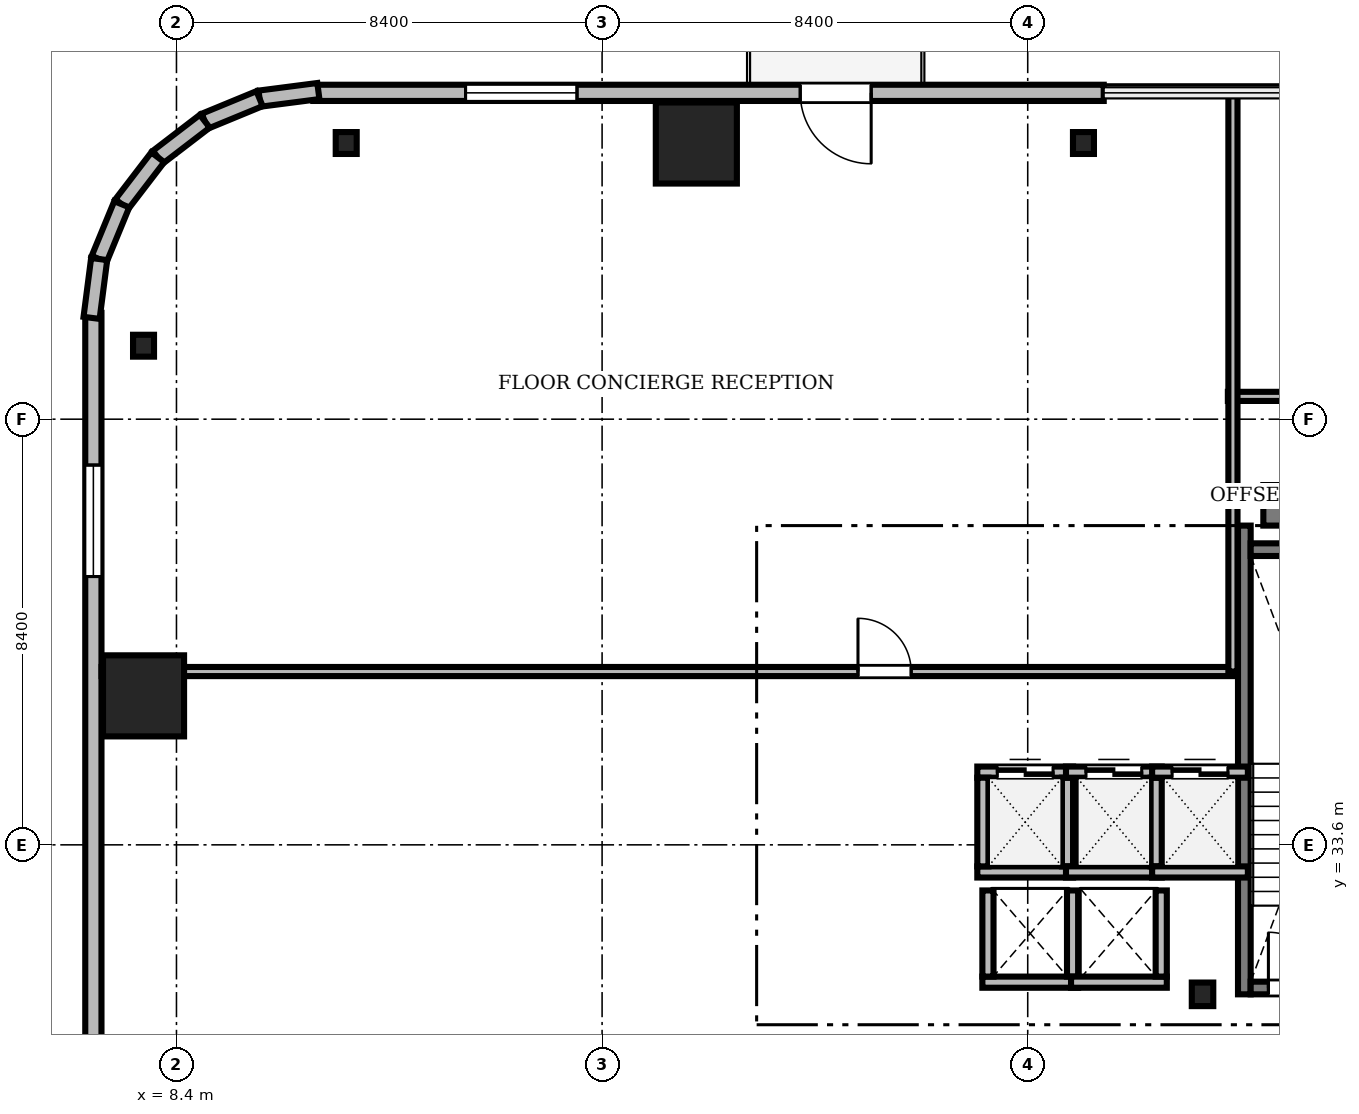
"""IFC4 building model, lengths in metres.
Left out: names, types, materials, properties, quantities, classifications, styles, units other than length and angle.
Written with IfcOpenShell. Run it as: python <this file> out.ifc"""

import sys

from ifc_helpers import new_model, si_unit, direction, frame, frame_2d, origin, origin_2d, place, context, subcontext, project, spatial, rectangle, i_section, extrude, source, transform, mapped, element, fill, save


model = new_model("IFC4")
c1 = context("Model", 3, precision=1e-05, world=origin(), true_north=direction((0.0, 1.0)))
c2 = subcontext(c1, "Body", "Model", "MODEL_VIEW")
j1 = project(units=[si_unit("LENGTHUNIT", "METRE"), si_unit("PLANEANGLEUNIT", "RADIAN")], contexts=[c1])
p1 = place(None, origin())
s1 = spatial("IfcSite", under=j1, at=p1, CompositionType="ELEMENT")
p2 = place(p1, origin())
s2 = spatial("IfcBuilding", under=s1, at=p2, CompositionType="ELEMENT")
p3 = place(p2, frame((0.0, 0.0, 152.0)))
s3 = spatial("IfcBuildingStorey", under=s2, at=p3, CompositionType="ELEMENT", Elevation=152.0)
m1 = source(origin(), c2, "Body", "SweptSolid", [
    extrude(rectangle(XDim=17.52, YDim=0.8, at=frame_2d((8.76, 0.0))), origin(), (0.0, 0.0, 1.0), 3.46),
])
p4 = place(p3, frame((29.85, 40.3, 0.0), z_axis=(0.0, 0.0, 1.0), x_axis=(1.0, 0.0, 0.0)))
e1 = element("IfcWall", 1, at=p4, inside=s3, PredefinedType="SHEAR", context=c2, shape_type="MappedRepresentation", body=[
    mapped(m1, transform((0.0, 0.0, 0.0), scale=1.0)),
])
m2 = source(origin(), c2, "Body", "SweptSolid", [
    extrude(i_section(OverallWidth=0.424, OverallDepth=0.465, WebThickness=0.035, FlangeThickness=0.056, FilletRadius=0.015, at=origin_2d()), origin(), (0.0, 0.0, 1.0), 3.46),
])
p5 = place(p3, frame((28.65, 30.65, 0.0), z_axis=(0.0, 0.0, 1.0), x_axis=(1.0, 0.0, 0.0)))
e2 = element("IfcColumn", 2, at=p5, inside=s3, PredefinedType="COLUMN", context=c2, shape_type="MappedRepresentation", body=[
    mapped(m2, transform((0.0, 0.0, 0.0), scale=1.0)),
])
m3 = source(origin(), c2, "Body", "SweptSolid", [
    extrude(rectangle(XDim=1.6, YDim=1.6, at=origin_2d()), origin(), (0.0, 0.0, 1.0), 3.46),
])
for number, where, z_axis, x_axis in (
    (3, (18.66, 47.45, 0.0), (0.0, 0.0, 1.0), (1.0, 0.0, 0.0)),
    (4, (7.75, 36.54, 0.0), (0.0, 0.0, 1.0), (1.0, 0.0, 0.0)),
):
    element("IfcColumn", number, at=place(p3, frame(where, z_axis=z_axis, x_axis=x_axis)), inside=s3, PredefinedType="COLUMN", context=c2, shape_type="MappedRepresentation", body=[
        mapped(m3, transform((0.0, 0.0, 0.0), scale=1.0)),
    ])
m4 = source(origin(), c2, "Body", "SweptSolid", [
    extrude(i_section(OverallWidth=0.414, OverallDepth=0.432, WebThickness=0.026, FlangeThickness=0.04, FilletRadius=0.015, at=origin_2d()), origin(), (0.0, 0.0, 1.0), 3.46),
])
for number, where, z_axis, x_axis in (
    (5, (26.3, 47.45, 0.0), (0.0, 0.0, 1.0), (1.0, 0.0, 0.0)),
    (6, (11.75, 47.45, 0.0), (0.0, 0.0, 1.0), (1.0, 0.0, 0.0)),
    (7, (7.75, 43.45, 0.0), (0.0, 0.0, 1.0), (1.0, 0.0, 0.0)),
):
    element("IfcColumn", number, at=place(p3, frame(where, z_axis=z_axis, x_axis=x_axis)), inside=s3, PredefinedType="COLUMN", context=c2, shape_type="MappedRepresentation", body=[
        mapped(m4, transform((0.0, 0.0, 0.0), scale=1.0)),
    ])
m5 = source(origin(), c2, "Body", "SweptSolid", [
    extrude(rectangle(XDim=15.6, YDim=0.32, at=frame_2d((7.8, 0.0))), origin(), (0.0, 0.0, 1.0), 3.46),
])
p6 = place(p3, frame((26.7, 48.44, 0.0), z_axis=(0.0, 0.0, 1.0), x_axis=(-1.0, 0.0, 0.0)))
e8 = element("IfcWall", 8, at=p6, inside=s3, PredefinedType="SOLIDWALL", context=c2, shape_type="MappedRepresentation", body=[
    mapped(m5, transform((0.0, 0.0, 0.0), scale=1.0)),
])
m6 = source(origin(), c2, "Body", "SweptSolid", [
    extrude(rectangle(XDim=1.4, YDim=2.3, at=frame_2d((0.7, 1.15))), frame((0.0, 0.17, 0.0), z_axis=(0.0, -1.0, 0.0), x_axis=(1.0, 0.0, 0.0)), (0.0, 0.0, 1.0), 0.34),
])
p7 = place(p6, frame((4.59, 0.0, 0.0)))
e9 = element("IfcOpeningElement", 9, at=p7, cuts=e8, PredefinedType="OPENING", context=c2, shape_type="MappedRepresentation", body=[
    mapped(m6, transform((0.0, 0.0, 0.0), scale=1.0)),
])
m7 = source(origin(), c2, "Body", "SweptSolid", [
    extrude(rectangle(XDim=2.2, YDim=2.4, at=frame_2d((1.1, 1.2))), frame((0.0, 0.17, 0.0), z_axis=(0.0, -1.0, 0.0), x_axis=(1.0, 0.0, 0.0)), (0.0, 0.0, 1.0), 0.34),
])
p8 = place(p6, frame((10.395, 0.0, 0.72)))
e10 = element("IfcOpeningElement", 10, at=p8, cuts=e8, PredefinedType="OPENING", context=c2, shape_type="MappedRepresentation", body=[
    mapped(m7, transform((0.0, 0.0, 0.0), scale=1.0)),
])
m8 = source(origin(), c2, "Body", "SweptSolid", [
    extrude(rectangle(XDim=15.6, YDim=0.32, at=frame_2d((7.8, 0.0))), origin(), (0.0, 0.0, 1.0), 3.46),
])
p9 = place(p3, frame((6.76, 44.1, 0.0), z_axis=(0.0, 0.0, 1.0), x_axis=(0.0, -1.0, 0.0)))
e11 = element("IfcWall", 11, at=p9, inside=s3, PredefinedType="SOLIDWALL", context=c2, shape_type="MappedRepresentation", body=[
    mapped(m8, transform((0.0, 0.0, 0.0), scale=1.0)),
])
p10 = place(p9, frame((3.005, 0.0, 0.72)))
e12 = element("IfcOpeningElement", 12, at=p10, cuts=e11, PredefinedType="OPENING", context=c2, shape_type="MappedRepresentation", body=[
    mapped(m7, transform((0.0, 0.0, 0.0), scale=1.0)),
])
m9 = source(origin(), c2, "Body", "SweptSolid", [
    extrude(rectangle(XDim=1.17, YDim=0.32, at=frame_2d((0.585, 0.0))), origin(), (0.0, 0.0, 1.0), 3.46),
])
p11 = place(p3, frame((11.2, 48.476, 0.0), z_axis=(0.0, 0.0, 1.0), x_axis=(-0.991735963317, -0.128295670475, 0.0)))
e13 = element("IfcWall", 13, at=p11, inside=s3, PredefinedType="SOLIDWALL", context=c2, shape_type="MappedRepresentation", body=[
    mapped(m9, transform((0.0, 0.0, 0.0), scale=1.0)),
])
m10 = source(origin(), c2, "Body", "SweptSolid", [
    extrude(rectangle(XDim=1.169, YDim=0.32, at=frame_2d((0.584, 0.0))), origin(), (0.0, 0.0, 1.0), 3.46),
])
p12 = place(p3, frame((10.04, 48.325, 0.0), z_axis=(0.0, 0.0, 1.0), x_axis=(-0.924552646638, -0.381054331552, 0.0)))
e14 = element("IfcWall", 14, at=p12, inside=s3, PredefinedType="SOLIDWALL", context=c2, shape_type="MappedRepresentation", body=[
    mapped(m10, transform((0.0, 0.0, 0.0), scale=1.0)),
])
m11 = source(origin(), c2, "Body", "SweptSolid", [
    extrude(rectangle(XDim=1.169, YDim=0.32, at=frame_2d((0.584, 0.0))), origin(), (0.0, 0.0, 1.0), 3.46),
])
p13 = place(p3, frame((8.959, 47.88, 0.0), z_axis=(0.0, 0.0, 1.0), x_axis=(-0.793663520347, -0.608356981114, 0.0)))
e15 = element("IfcWall", 15, at=p13, inside=s3, PredefinedType="SOLIDWALL", context=c2, shape_type="MappedRepresentation", body=[
    mapped(m11, transform((0.0, 0.0, 0.0), scale=1.0)),
])
m12 = source(origin(), c2, "Body", "SweptSolid", [
    extrude(rectangle(XDim=1.169, YDim=0.32, at=frame_2d((0.584, 0.0))), origin(), (0.0, 0.0, 1.0), 3.46),
])
p14 = place(p3, frame((8.031, 47.169, 0.0), z_axis=(0.0, 0.0, 1.0), x_axis=(-0.608387696831, -0.793639975269, 0.0)))
e16 = element("IfcWall", 16, at=p14, inside=s3, PredefinedType="SOLIDWALL", context=c2, shape_type="MappedRepresentation", body=[
    mapped(m12, transform((0.0, 0.0, 0.0), scale=1.0)),
])
p15 = place(p3, frame((7.32, 46.241, 0.0), z_axis=(0.0, 0.0, 1.0), x_axis=(-0.381054331552, -0.924552646638, 0.0)))
e17 = element("IfcWall", 17, at=p15, inside=s3, PredefinedType="SOLIDWALL", context=c2, shape_type="MappedRepresentation", body=[
    mapped(m10, transform((0.0, 0.0, 0.0), scale=1.0)),
])
p16 = place(p3, frame((6.875, 45.16, 0.0), z_axis=(0.0, 0.0, 1.0), x_axis=(-0.128295670475, -0.991735963317, 0.0)))
e18 = element("IfcWall", 18, at=p16, inside=s3, PredefinedType="SOLIDWALL", context=c2, shape_type="MappedRepresentation", body=[
    mapped(m9, transform((0.0, 0.0, 0.0), scale=1.0)),
])
m13 = source(origin(), c2, "Body", "SweptSolid", [
    extrude(rectangle(XDim=9.25, YDim=0.25, at=frame_2d((4.625, 0.0))), origin(), (0.0, 0.0, 1.0), 3.5),
])
p17 = place(p3, frame((29.475, 30.65, 0.0), z_axis=(0.0, 0.0, 1.0), x_axis=(0.0, 1.0, 0.0)))
e19 = element("IfcWall", 19, at=p17, inside=s3, PredefinedType="SOLIDWALL", context=c2, shape_type="MappedRepresentation", body=[
    mapped(m13, transform((0.0, 0.0, 0.0), scale=1.0)),
])
m14 = source(origin(), c2, "Body", "SweptSolid", [
    extrude(rectangle(XDim=3.15, YDim=0.25, at=frame_2d((1.575, 0.0))), origin(), (0.0, 0.0, 1.0), 3.5),
])
p18 = place(p3, frame((29.6, 39.425, 0.0), z_axis=(0.0, 0.0, 1.0), x_axis=(1.0, 0.0, 0.0)))
e20 = element("IfcWall", 20, at=p18, inside=s3, PredefinedType="SOLIDWALL", context=c2, shape_type="MappedRepresentation", body=[
    mapped(m14, transform((0.0, 0.0, 0.0), scale=1.0)),
])
p19 = place(p3, frame((29.6, 30.775, 0.0), z_axis=(0.0, 0.0, 1.0), x_axis=(1.0, 0.0, 0.0)))
e21 = element("IfcWall", 21, at=p19, inside=s3, PredefinedType="SOLIDWALL", context=c2, shape_type="MappedRepresentation", body=[
    mapped(m14, transform((0.0, 0.0, 0.0), scale=1.0)),
])
m15 = source(origin(), c2, "Body", "SweptSolid", [
    extrude(rectangle(XDim=1.1, YDim=2.2, at=frame_2d((0.55, 1.1))), frame((0.0, 0.135, 0.0), z_axis=(0.0, -1.0, 0.0), x_axis=(1.0, 0.0, 0.0)), (0.0, 0.0, 1.0), 0.27),
])
p20 = place(p19, frame((0.35, 0.0, 0.0)))
e22 = element("IfcOpeningElement", 22, at=p20, cuts=e21, PredefinedType="OPENING", context=c2, shape_type="MappedRepresentation", body=[
    mapped(m15, transform((0.0, 0.0, 0.0), scale=1.0)),
])
m16 = source(origin(), c2, "Body", "SweptSolid", [
    extrude(rectangle(XDim=1.89, YDim=0.22, at=frame_2d((0.945, 0.0))), origin(), (0.0, 0.0, 1.0), 3.46),
])
p21 = place(p3, frame((24.205, 33.065, 0.0), z_axis=(0.0, 0.0, 1.0), x_axis=(1.0, 0.0, 0.0)))
e23 = element("IfcWall", 23, at=p21, inside=s3, PredefinedType="SOLIDWALL", context=c2, shape_type="MappedRepresentation", body=[
    mapped(m16, transform((0.0, 0.0, 0.0), scale=1.0)),
])
p22 = place(p3, frame((24.205, 35.035, 0.0), z_axis=(0.0, 0.0, 1.0), x_axis=(1.0, 0.0, 0.0)))
e24 = element("IfcWall", 24, at=p22, inside=s3, PredefinedType="SOLIDWALL", context=c2, shape_type="MappedRepresentation", body=[
    mapped(m16, transform((0.0, 0.0, 0.0), scale=1.0)),
])
m17 = source(origin(), c2, "Body", "SweptSolid", [
    extrude(rectangle(XDim=1.1, YDim=2.2, at=frame_2d((0.55, 1.1))), frame((0.0, 0.12, 0.0), z_axis=(0.0, -1.0, 0.0), x_axis=(1.0, 0.0, 0.0)), (0.0, 0.0, 1.0), 0.24),
])
p23 = place(p22, frame((0.395, 0.0, 0.0)))
e25 = element("IfcOpeningElement", 25, at=p23, cuts=e24, PredefinedType="OPENING", context=c2, shape_type="MappedRepresentation", body=[
    mapped(m17, transform((0.0, 0.0, 0.0), scale=1.0)),
])
m18 = source(origin(), c2, "Body", "SweptSolid", [
    extrude(rectangle(XDim=1.75, YDim=0.22, at=frame_2d((0.875, 0.0))), origin(), (0.0, 0.0, 1.0), 3.46),
])
for number, where, z_axis, x_axis in (
    (26, (24.315, 33.175, 0.0), (0.0, 0.0, 1.0), (0.0, 1.0, 0.0)),
    (27, (25.985, 33.175, 0.0), (0.0, 0.0, 1.0), (0.0, 1.0, 0.0)),
):
    element("IfcWall", number, at=place(p3, frame(where, z_axis=z_axis, x_axis=x_axis)), inside=s3, PredefinedType="SOLIDWALL", context=c2, shape_type="MappedRepresentation", body=[
        mapped(m18, transform((0.0, 0.0, 0.0), scale=1.0)),
    ])
p24 = place(p3, frame((25.955, 33.065, 0.0), z_axis=(0.0, 0.0, 1.0), x_axis=(1.0, 0.0, 0.0)))
e28 = element("IfcWall", 28, at=p24, inside=s3, PredefinedType="SOLIDWALL", context=c2, shape_type="MappedRepresentation", body=[
    mapped(m16, transform((0.0, 0.0, 0.0), scale=1.0)),
])
p25 = place(p3, frame((25.955, 35.035, 0.0), z_axis=(0.0, 0.0, 1.0), x_axis=(1.0, 0.0, 0.0)))
e29 = element("IfcWall", 29, at=p25, inside=s3, PredefinedType="SOLIDWALL", context=c2, shape_type="MappedRepresentation", body=[
    mapped(m16, transform((0.0, 0.0, 0.0), scale=1.0)),
])
p26 = place(p25, frame((0.395, 0.0, 0.0)))
e30 = element("IfcOpeningElement", 30, at=p26, cuts=e29, PredefinedType="OPENING", context=c2, shape_type="MappedRepresentation", body=[
    mapped(m17, transform((0.0, 0.0, 0.0), scale=1.0)),
])
p27 = place(p3, frame((27.735, 33.175, 0.0), z_axis=(0.0, 0.0, 1.0), x_axis=(0.0, 1.0, 0.0)))
e31 = element("IfcWall", 31, at=p27, inside=s3, PredefinedType="SOLIDWALL", context=c2, shape_type="MappedRepresentation", body=[
    mapped(m18, transform((0.0, 0.0, 0.0), scale=1.0)),
])
p28 = place(p3, frame((27.655, 33.065, 0.0), z_axis=(0.0, 0.0, 1.0), x_axis=(1.0, 0.0, 0.0)))
e32 = element("IfcWall", 32, at=p28, inside=s3, PredefinedType="SOLIDWALL", context=c2, shape_type="MappedRepresentation", body=[
    mapped(m16, transform((0.0, 0.0, 0.0), scale=1.0)),
])
p29 = place(p3, frame((27.655, 35.035, 0.0), z_axis=(0.0, 0.0, 1.0), x_axis=(1.0, 0.0, 0.0)))
e33 = element("IfcWall", 33, at=p29, inside=s3, PredefinedType="SOLIDWALL", context=c2, shape_type="MappedRepresentation", body=[
    mapped(m16, transform((0.0, 0.0, 0.0), scale=1.0)),
])
p30 = place(p29, frame((0.395, 0.0, 0.0)))
e34 = element("IfcOpeningElement", 34, at=p30, cuts=e33, PredefinedType="OPENING", context=c2, shape_type="MappedRepresentation", body=[
    mapped(m17, transform((0.0, 0.0, 0.0), scale=1.0)),
])
m19 = source(origin(), c2, "Body", "SweptSolid", [
    extrude(rectangle(XDim=1.89, YDim=0.22, at=frame_2d((0.945, 0.0))), origin(), (0.0, 0.0, 1.0), 3.46),
])
p31 = place(p3, frame((24.305, 30.89, 0.0), z_axis=(0.0, 0.0, 1.0), x_axis=(1.0, 0.0, 0.0)))
e35 = element("IfcWall", 35, at=p31, inside=s3, PredefinedType="SOLIDWALL", context=c2, shape_type="MappedRepresentation", body=[
    mapped(m19, transform((0.0, 0.0, 0.0), scale=1.0)),
])
m20 = source(origin(), c2, "Body", "SweptSolid", [
    extrude(rectangle(XDim=1.7, YDim=0.22, at=frame_2d((0.85, 0.0))), origin(), (0.0, 0.0, 1.0), 3.46),
])
for number, where, z_axis, x_axis in (
    (36, (24.415, 31.0, 0.0), (0.0, 0.0, 1.0), (0.0, 1.0, 0.0)),
    (37, (26.085, 31.0, 0.0), (0.0, 0.0, 1.0), (0.0, 1.0, 0.0)),
):
    element("IfcWall", number, at=place(p3, frame(where, z_axis=z_axis, x_axis=x_axis)), inside=s3, PredefinedType="SOLIDWALL", context=c2, shape_type="MappedRepresentation", body=[
        mapped(m20, transform((0.0, 0.0, 0.0), scale=1.0)),
    ])
p32 = place(p3, frame((26.055, 30.89, 0.0), z_axis=(0.0, 0.0, 1.0), x_axis=(1.0, 0.0, 0.0)))
e38 = element("IfcWall", 38, at=p32, inside=s3, PredefinedType="SOLIDWALL", context=c2, shape_type="MappedRepresentation", body=[
    mapped(m19, transform((0.0, 0.0, 0.0), scale=1.0)),
])
p33 = place(p3, frame((27.835, 31.0, 0.0), z_axis=(0.0, 0.0, 1.0), x_axis=(0.0, 1.0, 0.0)))
e39 = element("IfcWall", 39, at=p33, inside=s3, PredefinedType="SOLIDWALL", context=c2, shape_type="MappedRepresentation", body=[
    mapped(m20, transform((0.0, 0.0, 0.0), scale=1.0)),
])
m21 = source(origin(), c2, "Body", "SweptSolid", [
    extrude(rectangle(XDim=23.928, YDim=0.18, at=frame_2d((11.964, 0.0))), origin(), (0.0, 0.0, 1.0), 2.702),
])
p34 = place(p3, frame((29.15, 42.45, 0.0), z_axis=(0.0, 0.0, 1.0), x_axis=(1.0, 0.0, 0.0)))
e40 = element("IfcWall", 40, at=p34, inside=s3, PredefinedType="PARTITIONING", context=c2, shape_type="MappedRepresentation", body=[
    mapped(m21, transform((0.0, 0.0, 0.0), scale=1.0)),
])
m22 = source(origin(), c2, "Body", "SweptSolid", [
    extrude(rectangle(XDim=1.05, YDim=2.2, at=frame_2d((0.525, 1.1))), frame((0.0, 0.1, 0.0), z_axis=(0.0, -1.0, 0.0), x_axis=(1.0, 0.0, 0.0)), (0.0, 0.0, 1.0), 0.2),
])
p35 = place(p34, frame((4.5, 0.0, 0.0)))
e41 = element("IfcOpeningElement", 41, at=p35, cuts=e40, PredefinedType="OPENING", context=c2, shape_type="MappedRepresentation", body=[
    mapped(m22, transform((0.0, 0.0, 0.0), scale=1.0)),
])
m23 = source(origin(), c2, "Body", "SweptSolid", [
    extrude(rectangle(XDim=22.328, YDim=0.18, at=frame_2d((11.164, 0.0))), origin(), (0.0, 0.0, 1.0), 2.702),
])
p36 = place(p3, frame((6.922, 37.02, 0.0), z_axis=(0.0, 0.0, 1.0), x_axis=(1.0, 0.0, 0.0)))
e42 = element("IfcWall", 42, at=p36, inside=s3, PredefinedType="PARTITIONING", context=c2, shape_type="MappedRepresentation", body=[
    mapped(m23, transform((0.0, 0.0, 0.0), scale=1.0)),
])
p37 = place(p36, frame((14.928, 0.0, 0.0)))
e43 = element("IfcOpeningElement", 43, at=p37, cuts=e42, PredefinedType="OPENING", context=c2, shape_type="MappedRepresentation", body=[
    mapped(m22, transform((0.0, 0.0, 0.0), scale=1.0)),
])
m24 = source(origin(), c2, "Body", "SweptSolid", [
    extrude(rectangle(XDim=11.45, YDim=0.18, at=frame_2d((5.725, 0.0))), origin(), (0.0, 0.0, 1.0), 2.702),
])
p38 = place(p3, frame((29.25, 37.02, 0.0), z_axis=(0.0, 0.0, 1.0), x_axis=(0.0, 1.0, 0.0)))
e44 = element("IfcWall", 44, at=p38, inside=s3, PredefinedType="PARTITIONING", context=c2, shape_type="MappedRepresentation", body=[
    mapped(m24, transform((0.0, 0.0, 0.0), scale=1.0)),
])
m25 = source(origin(), c2, "Body", "SweptSolid", [
    extrude(rectangle(XDim=1.4, YDim=2.3, at=frame_2d((0.7, 1.15))), frame((0.0, 0.025, 0.0), z_axis=(0.0, -1.0, 0.0), x_axis=(1.0, 0.0, 0.0)), (0.0, 0.0, 1.0), 0.05),
])
p39 = place(p7, frame((1.4, 0.0, 0.0), z_axis=(0.0, 0.0, 1.0), x_axis=(-1.0, 0.0, 0.0)))
e45 = element("IfcDoor", 45, at=p39, inside=s3, OperationType="DOUBLE_DOOR_SLIDING", PredefinedType="DOOR", context=c2, shape_type="MappedRepresentation", body=[
    mapped(m25, transform((0.0, 0.0, 0.0), scale=1.0)),
])
fill(e9, e45)
m26 = source(origin(), c2, "Body", "SweptSolid", [
    extrude(rectangle(XDim=2.2, YDim=2.4, at=frame_2d((1.1, 1.2))), frame((0.0, 0.03, 0.0), z_axis=(0.0, -1.0, 0.0), x_axis=(1.0, 0.0, 0.0)), (0.0, 0.0, 1.0), 0.06),
])
p40 = place(p8, origin())
e46 = element("IfcWindow", 46, at=p40, inside=s3, PartitioningType="SINGLE_PANEL", PredefinedType="WINDOW", context=c2, shape_type="MappedRepresentation", body=[
    mapped(m26, transform((0.0, 0.0, 0.0), scale=1.0)),
])
fill(e10, e46)
p41 = place(p10, origin())
e47 = element("IfcWindow", 47, at=p41, inside=s3, PartitioningType="SINGLE_PANEL", PredefinedType="WINDOW", context=c2, shape_type="MappedRepresentation", body=[
    mapped(m26, transform((0.0, 0.0, 0.0), scale=1.0)),
])
fill(e12, e47)
m27 = source(origin(), c2, "Body", "SweptSolid", [
    extrude(rectangle(XDim=1.1, YDim=2.2, at=frame_2d((0.55, 1.1))), frame((0.0, 0.025, 0.0), z_axis=(0.0, -1.0, 0.0), x_axis=(1.0, 0.0, 0.0)), (0.0, 0.0, 1.0), 0.05),
])
p42 = place(p20, origin())
e48 = element("IfcDoor", 48, at=p42, inside=s3, OperationType="SINGLE_SWING_LEFT", PredefinedType="DOOR", context=c2, shape_type="MappedRepresentation", body=[
    mapped(m27, transform((0.0, 0.0, 0.0), scale=1.0)),
])
fill(e22, e48)
p43 = place(p23, origin())
e49 = element("IfcDoor", 49, at=p43, inside=s3, OperationType="DOUBLE_DOOR_SLIDING", PredefinedType="DOOR", context=c2, shape_type="MappedRepresentation", body=[
    mapped(m27, transform((0.0, 0.0, 0.0), scale=1.0)),
])
fill(e25, e49)
p44 = place(p26, origin())
e50 = element("IfcDoor", 50, at=p44, inside=s3, OperationType="DOUBLE_DOOR_SLIDING", PredefinedType="DOOR", context=c2, shape_type="MappedRepresentation", body=[
    mapped(m27, transform((0.0, 0.0, 0.0), scale=1.0)),
])
fill(e30, e50)
p45 = place(p30, origin())
e51 = element("IfcDoor", 51, at=p45, inside=s3, OperationType="DOUBLE_DOOR_SLIDING", PredefinedType="DOOR", context=c2, shape_type="MappedRepresentation", body=[
    mapped(m27, transform((0.0, 0.0, 0.0), scale=1.0)),
])
fill(e34, e51)
m28 = source(origin(), c2, "Body", "SweptSolid", [
    extrude(rectangle(XDim=1.05, YDim=2.2, at=frame_2d((0.525, 1.1))), frame((0.0, 0.025, 0.0), z_axis=(0.0, -1.0, 0.0), x_axis=(1.0, 0.0, 0.0)), (0.0, 0.0, 1.0), 0.05),
])
p46 = place(p37, origin())
e52 = element("IfcDoor", 52, at=p46, inside=s3, OperationType="SINGLE_SWING_LEFT", PredefinedType="DOOR", context=c2, shape_type="MappedRepresentation", body=[
    mapped(m28, transform((0.0, 0.0, 0.0), scale=1.0)),
])
fill(e43, e52)
save(model, sys.argv[1])
